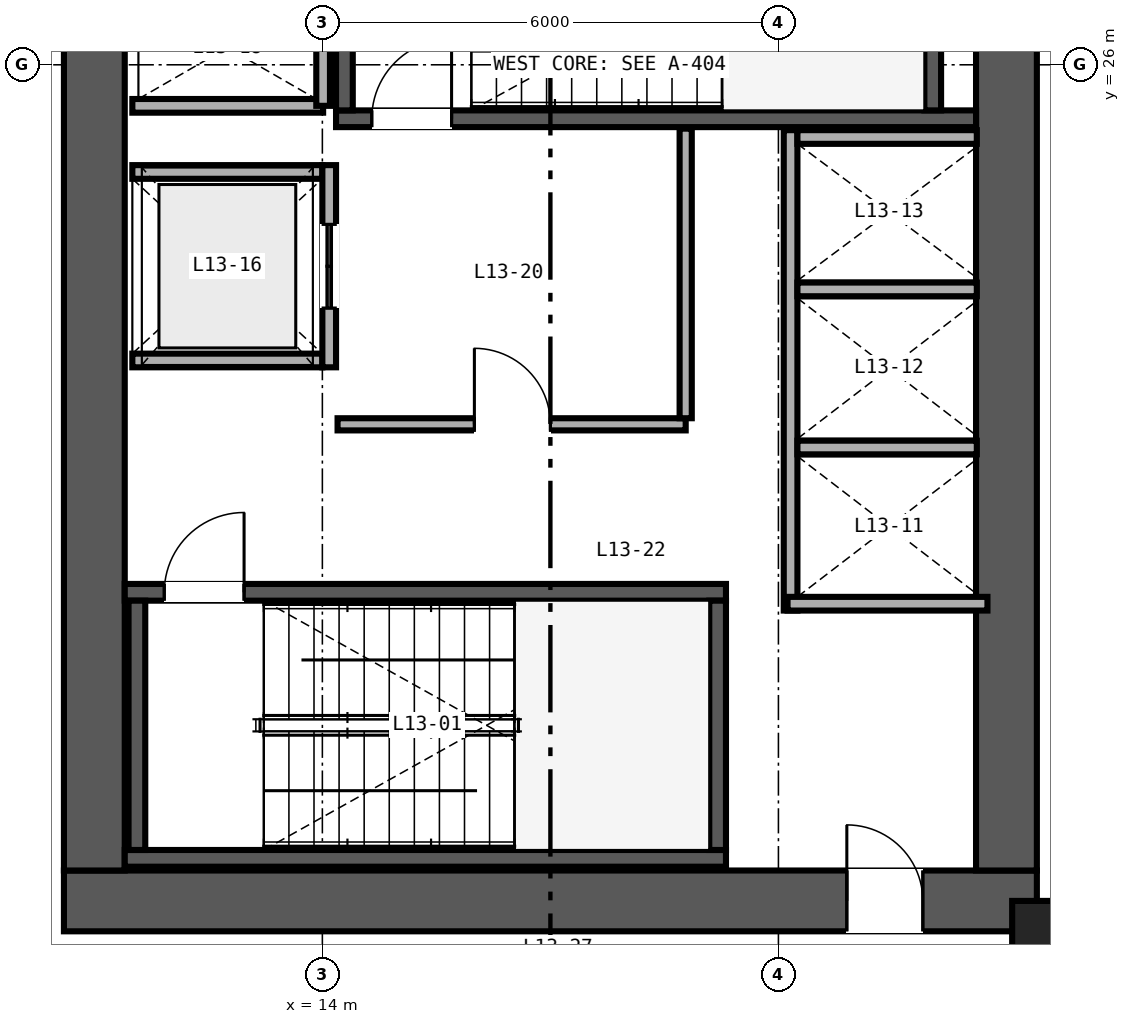
"""IFC4 building model, lengths in metres.
Left out: names, types, materials, properties, quantities, classifications, styles, units other than length and angle.
Written with IfcOpenShell. Run it as: python <this file> out.ifc"""

import sys

from ifc_helpers import new_model, si_unit, direction, frame, frame_2d, origin, origin_2d, place, context, subcontext, project, spatial, rectangle, hollow_rectangle, extrude, source, transform, mapped, element, fill, save


model = new_model("IFC4")
c1 = context("Model", 3, precision=1e-05, world=origin(), true_north=direction((0.0, 1.0)))
c2 = subcontext(c1, "Body", "Model", "MODEL_VIEW")
j1 = project(units=[si_unit("LENGTHUNIT", "METRE"), si_unit("PLANEANGLEUNIT", "RADIAN")], contexts=[c1])
p1 = place(None, origin())
s1 = spatial("IfcSite", under=j1, at=p1, CompositionType="ELEMENT")
p2 = place(p1, origin())
s2 = spatial("IfcBuilding", under=s1, at=p2, CompositionType="ELEMENT")
p3 = place(p2, frame((0.0, 0.0, 56.4)))
s3 = spatial("IfcBuildingStorey", under=s2, at=p3, CompositionType="ELEMENT", Elevation=56.4)
p4 = place(p3, frame((10.6, 15.0, 0.0), z_axis=(0.0, 0.0, 1.0), x_axis=(1.0, 0.0, 0.0)))
e1 = element("IfcWall", 1, at=p4, inside=s3, PredefinedType="SHEAR", context=c2, shape_type="SweptSolid", body=[
    extrude(rectangle(XDim=12.8, YDim=0.8, at=frame_2d((6.4, 0.0))), origin(), (0.0, 0.0, 1.0), 3.35),
])
p5 = place(p4, frame((10.3, 0.0, 0.0)))
e2 = element("IfcOpeningElement", 2, at=p5, cuts=e1, PredefinedType="OPENING", context=c2, shape_type="SweptSolid", body=[
    extrude(rectangle(XDim=1.0, YDim=2.15, at=frame_2d((0.5, 1.075))), frame((0.0, 0.41, 0.0), z_axis=(0.0, -1.0, 0.0), x_axis=(1.0, 0.0, 0.0)), (0.0, 0.0, 1.0), 0.82),
])
for number, where, z_axis, x_axis in (
    (3, (11.0, 15.4, 0.0), (0.0, 0.0, 1.0), (0.0, 1.0, 0.0)),
    (4, (23.0, 15.4, 0.0), (0.0, 0.0, 1.0), (0.0, 1.0, 0.0)),
):
    element("IfcWall", number, at=place(p3, frame(where, z_axis=z_axis, x_axis=x_axis)), inside=s3, PredefinedType="SHEAR", context=c2, shape_type="SweptSolid", body=[
        extrude(rectangle(XDim=21.2, YDim=0.8, at=frame_2d((10.6, 0.0))), origin(), (0.0, 0.0, 1.0), 3.35),
    ])
p6 = place(p3, frame((11.4, 15.56, 0.0), z_axis=(0.0, 0.0, 1.0), x_axis=(1.0, 0.0, 0.0)))
e5 = element("IfcWall", 5, at=p6, inside=s3, PredefinedType="SHEAR", context=c2, shape_type="SweptSolid", body=[
    extrude(rectangle(XDim=7.91, YDim=0.22, at=frame_2d((3.955, 0.0))), origin(), (0.0, 0.0, 1.0), 3.4),
])
p7 = place(p3, frame((11.4, 19.06, 0.0), z_axis=(0.0, 0.0, 1.0), x_axis=(1.0, 0.0, 0.0)))
e6 = element("IfcWall", 6, at=p7, inside=s3, PredefinedType="SHEAR", context=c2, shape_type="SweptSolid", body=[
    extrude(rectangle(XDim=7.91, YDim=0.22, at=frame_2d((3.955, 0.0))), origin(), (0.0, 0.0, 1.0), 3.4),
])
p8 = place(p7, frame((0.52, 0.0, 0.0)))
e7 = element("IfcOpeningElement", 7, at=p8, cuts=e6, PredefinedType="OPENING", context=c2, shape_type="SweptSolid", body=[
    extrude(rectangle(XDim=1.05, YDim=2.15, at=frame_2d((0.525, 1.075))), frame((0.0, 0.12, 0.0), z_axis=(0.0, -1.0, 0.0), x_axis=(1.0, 0.0, 0.0)), (0.0, 0.0, 1.0), 0.24),
])
for number, where, z_axis, x_axis in (
    (8, (11.56, 15.67, 0.0), (0.0, 0.0, 1.0), (0.0, 1.0, 0.0)),
    (9, (19.2, 15.67, 0.0), (0.0, 0.0, 1.0), (0.0, 1.0, 0.0)),
):
    element("IfcWall", number, at=place(p3, frame(where, z_axis=z_axis, x_axis=x_axis)), inside=s3, PredefinedType="SHEAR", context=c2, shape_type="SweptSolid", body=[
        extrude(rectangle(XDim=3.28, YDim=0.22, at=frame_2d((1.64, 0.0))), origin(), (0.0, 0.0, 1.0), 3.4),
    ])
p9 = place(p3, frame((14.18, 25.29, 0.0), z_axis=(0.0, 0.0, 1.0), x_axis=(1.0, 0.0, 0.0)))
e10 = element("IfcWall", 10, at=p9, inside=s3, PredefinedType="SHEAR", context=c2, shape_type="SweptSolid", body=[
    extrude(rectangle(XDim=8.42, YDim=0.22, at=frame_2d((4.21, 0.0))), origin(), (0.0, 0.0, 1.0), 3.4),
])
p10 = place(p9, frame((0.47, 0.0, 0.0)))
e11 = element("IfcOpeningElement", 11, at=p10, cuts=e10, PredefinedType="OPENING", context=c2, shape_type="SweptSolid", body=[
    extrude(rectangle(XDim=1.05, YDim=2.15, at=frame_2d((0.525, 1.075))), frame((0.0, 0.12, 0.0), z_axis=(0.0, -1.0, 0.0), x_axis=(1.0, 0.0, 0.0)), (0.0, 0.0, 1.0), 0.24),
])
for number, where, z_axis, x_axis in (
    (12, (14.29, 25.4, 0.0), (0.0, 0.0, 1.0), (0.0, 1.0, 0.0)),
    (13, (22.03, 25.4, 0.0), (0.0, 0.0, 1.0), (0.0, 1.0, 0.0)),
):
    element("IfcWall", number, at=place(p3, frame(where, z_axis=z_axis, x_axis=x_axis)), inside=s3, PredefinedType="SHEAR", context=c2, shape_type="SweptSolid", body=[
        extrude(rectangle(XDim=3.28, YDim=0.22, at=frame_2d((1.64, 0.0))), origin(), (0.0, 0.0, 1.0), 3.4),
    ])
m1 = source(origin(), c2, "Body", "SweptSolid", [
    extrude(hollow_rectangle(XDim=0.85, YDim=0.9, WallThickness=0.04, at=origin_2d()), origin(), (0.0, 0.0, 1.0), 3.35),
])
p11 = place(p3, frame((23.5, 14.55, 0.0), z_axis=(0.0, 0.0, 1.0), x_axis=(1.0, 0.0, 0.0)))
e14 = element("IfcColumn", 14, at=p11, inside=s3, PredefinedType="COLUMN", context=c2, shape_type="MappedRepresentation", body=[
    mapped(m1, transform((0.0, 0.0, 0.0), scale=1.0)),
])
p12 = place(p3, frame((20.16, 18.82, 0.0), z_axis=(0.0, 0.0, 1.0), x_axis=(0.0, 1.0, 0.0)))
e15 = element("IfcWall", 15, at=p12, inside=s3, PredefinedType="SOLIDWALL", context=c2, shape_type="SweptSolid", body=[
    extrude(rectangle(XDim=6.32, YDim=0.18, at=frame_2d((3.16, 0.0))), origin(), (0.0, 0.0, 1.0), 2.36),
])
p13 = place(p3, frame((20.12, 18.91, 0.0), z_axis=(0.0, 0.0, 1.0), x_axis=(1.0, 0.0, 0.0)))
e16 = element("IfcWall", 16, at=p13, inside=s3, PredefinedType="SOLIDWALL", context=c2, shape_type="SweptSolid", body=[
    extrude(rectangle(XDim=2.63, YDim=0.18, at=frame_2d((1.315, 0.0))), origin(), (0.0, 0.0, 1.0), 3.35),
])
p14 = place(p3, frame((20.25, 25.05, 0.0), z_axis=(0.0, 0.0, 1.0), x_axis=(1.0, 0.0, 0.0)))
e17 = element("IfcWall", 17, at=p14, inside=s3, PredefinedType="SOLIDWALL", context=c2, shape_type="SweptSolid", body=[
    extrude(rectangle(XDim=2.36, YDim=0.18, at=frame_2d((1.18, 0.0))), origin(), (0.0, 0.0, 1.0), 3.35),
])
p15 = place(p3, frame((20.25, 20.965, 0.0), z_axis=(0.0, 0.0, 1.0), x_axis=(1.0, 0.0, 0.0)))
e18 = element("IfcWall", 18, at=p15, inside=s3, PredefinedType="SOLIDWALL", context=c2, shape_type="SweptSolid", body=[
    extrude(rectangle(XDim=2.36, YDim=0.18, at=frame_2d((1.18, 0.0))), origin(), (0.0, 0.0, 1.0), 2.36),
])
p16 = place(p3, frame((20.25, 23.045, 0.0), z_axis=(0.0, 0.0, 1.0), x_axis=(1.0, 0.0, 0.0)))
e19 = element("IfcWall", 19, at=p16, inside=s3, PredefinedType="SOLIDWALL", context=c2, shape_type="SweptSolid", body=[
    extrude(rectangle(XDim=2.36, YDim=0.18, at=frame_2d((1.18, 0.0))), origin(), (0.0, 0.0, 1.0), 3.35),
])
for number, where, z_axis, x_axis in (
    (20, (11.5, 22.11, 0.0), (0.0, 0.0, 1.0), (1.0, 0.0, 0.0)),
    (21, (11.5, 24.59, 0.0), (0.0, 0.0, 1.0), (1.0, 0.0, 0.0)),
):
    element("IfcWall", number, at=place(p3, frame(where, z_axis=z_axis, x_axis=x_axis)), inside=s3, PredefinedType="SOLIDWALL", context=c2, shape_type="SweptSolid", body=[
        extrude(rectangle(XDim=2.5, YDim=0.18, at=frame_2d((1.25, 0.0))), origin(), (0.0, 0.0, 1.0), 3.35),
    ])
p17 = place(p3, frame((14.09, 22.02, 0.0), z_axis=(0.0, 0.0, 1.0), x_axis=(0.0, 1.0, 0.0)))
e22 = element("IfcWall", 22, at=p17, inside=s3, PredefinedType="SOLIDWALL", context=c2, shape_type="SweptSolid", body=[
    extrude(rectangle(XDim=2.66, YDim=0.18, at=frame_2d((1.33, 0.0))), origin(), (0.0, 0.0, 1.0), 3.35),
])
p18 = place(p17, frame((0.78, 0.0, 0.0)))
e23 = element("IfcOpeningElement", 23, at=p18, cuts=e22, PredefinedType="OPENING", context=c2, shape_type="SweptSolid", body=[
    extrude(rectangle(XDim=1.1, YDim=2.2, at=frame_2d((0.55, 1.1))), frame((0.0, 0.1, 0.0), z_axis=(0.0, -1.0, 0.0), x_axis=(1.0, 0.0, 0.0)), (0.0, 0.0, 1.0), 0.2),
])
p19 = place(p3, frame((11.5, 25.46, 0.0), z_axis=(0.0, 0.0, 1.0), x_axis=(1.0, 0.0, 0.0)))
e24 = element("IfcWall", 24, at=p19, inside=s3, PredefinedType="SOLIDWALL", context=c2, shape_type="SweptSolid", body=[
    extrude(rectangle(XDim=2.51, YDim=0.18, at=frame_2d((1.255, 0.0))), origin(), (0.0, 0.0, 1.0), 3.35),
])
p20 = place(p3, frame((14.01, 25.46, 0.0), z_axis=(0.0, 0.0, 1.0), x_axis=(0.0, 1.0, 0.0)))
e25 = element("IfcWall", 25, at=p20, inside=s3, PredefinedType="SOLIDWALL", context=c2, shape_type="SweptSolid", body=[
    extrude(rectangle(XDim=3.08, YDim=0.18, at=frame_2d((1.54, 0.0))), origin(), (0.0, 0.0, 1.0), 3.35),
])
p21 = place(p3, frame((14.2, 21.27, 0.0), z_axis=(0.0, 0.0, 1.0), x_axis=(1.0, 0.0, 0.0)))
e26 = element("IfcWall", 26, at=p21, inside=s3, PredefinedType="PARTITIONING", context=c2, shape_type="SweptSolid", body=[
    extrude(rectangle(XDim=4.58, YDim=0.16, at=frame_2d((2.29, 0.0))), origin(), (0.0, 0.0, 1.0), 3.35),
])
p22 = place(p21, frame((1.8, 0.0, 0.0)))
e27 = element("IfcOpeningElement", 27, at=p22, cuts=e26, PredefinedType="OPENING", context=c2, shape_type="SweptSolid", body=[
    extrude(rectangle(XDim=1.0, YDim=2.15, at=frame_2d((0.5, 1.075))), frame((0.0, 0.09, 0.0), z_axis=(0.0, -1.0, 0.0), x_axis=(1.0, 0.0, 0.0)), (0.0, 0.0, 1.0), 0.18),
])
p23 = place(p3, frame((18.78, 21.35, 0.0), z_axis=(0.0, 0.0, 1.0), x_axis=(0.0, 1.0, 0.0)))
e28 = element("IfcWall", 28, at=p23, inside=s3, PredefinedType="PARTITIONING", context=c2, shape_type="SweptSolid", body=[
    extrude(rectangle(XDim=3.81, YDim=0.16, at=frame_2d((1.905, 0.0))), origin(), (0.0, 0.0, 1.0), 3.35),
])
m2 = source(origin(), c2, "Body", "SweptSolid", [
    extrude(rectangle(XDim=1.05, YDim=2.15, at=frame_2d((0.525, 1.075))), frame((0.0, 0.025, 0.0), z_axis=(0.0, -1.0, 0.0), x_axis=(1.0, 0.0, 0.0)), (0.0, 0.0, 1.0), 0.05),
])
p24 = place(p8, origin())
e29 = element("IfcDoor", 29, at=p24, inside=s3, OperationType="SINGLE_SWING_RIGHT", PredefinedType="DOOR", context=c2, shape_type="MappedRepresentation", body=[
    mapped(m2, transform((0.0, 0.0, 0.0), scale=1.0)),
])
fill(e7, e29)
p25 = place(p10, origin())
e30 = element("IfcDoor", 30, at=p25, inside=s3, OperationType="SINGLE_SWING_RIGHT", PredefinedType="DOOR", context=c2, shape_type="MappedRepresentation", body=[
    mapped(m2, transform((0.0, 0.0, 0.0), scale=1.0)),
])
fill(e11, e30)
m3 = source(origin(), c2, "Body", "SweptSolid", [
    extrude(rectangle(XDim=1.1, YDim=2.2, at=frame_2d((0.55, 1.1))), frame((0.0, 0.025, 0.0), z_axis=(0.0, -1.0, 0.0), x_axis=(1.0, 0.0, 0.0)), (0.0, 0.0, 1.0), 0.05),
])
p26 = place(p18, origin())
e31 = element("IfcDoor", 31, at=p26, inside=s3, OperationType="DOUBLE_DOOR_SLIDING", PredefinedType="DOOR", context=c2, shape_type="MappedRepresentation", body=[
    mapped(m3, transform((0.0, 0.0, 0.0), scale=1.0)),
])
fill(e23, e31)
m4 = source(origin(), c2, "Body", "SweptSolid", [
    extrude(rectangle(XDim=1.0, YDim=2.15, at=frame_2d((0.5, 1.075))), frame((0.0, 0.025, 0.0), z_axis=(0.0, -1.0, 0.0), x_axis=(1.0, 0.0, 0.0)), (0.0, 0.0, 1.0), 0.05),
])
p27 = place(p22, origin())
e32 = element("IfcDoor", 32, at=p27, inside=s3, OperationType="SINGLE_SWING_LEFT", PredefinedType="DOOR", context=c2, shape_type="MappedRepresentation", body=[
    mapped(m4, transform((0.0, 0.0, 0.0), scale=1.0)),
])
fill(e27, e32)
p28 = place(p5, origin())
e33 = element("IfcDoor", 33, at=p28, inside=s3, OperationType="SINGLE_SWING_LEFT", PredefinedType="DOOR", context=c2, shape_type="MappedRepresentation", body=[
    mapped(m4, transform((0.0, 0.0, 0.0), scale=1.0)),
])
fill(e2, e33)
save(model, sys.argv[1])
